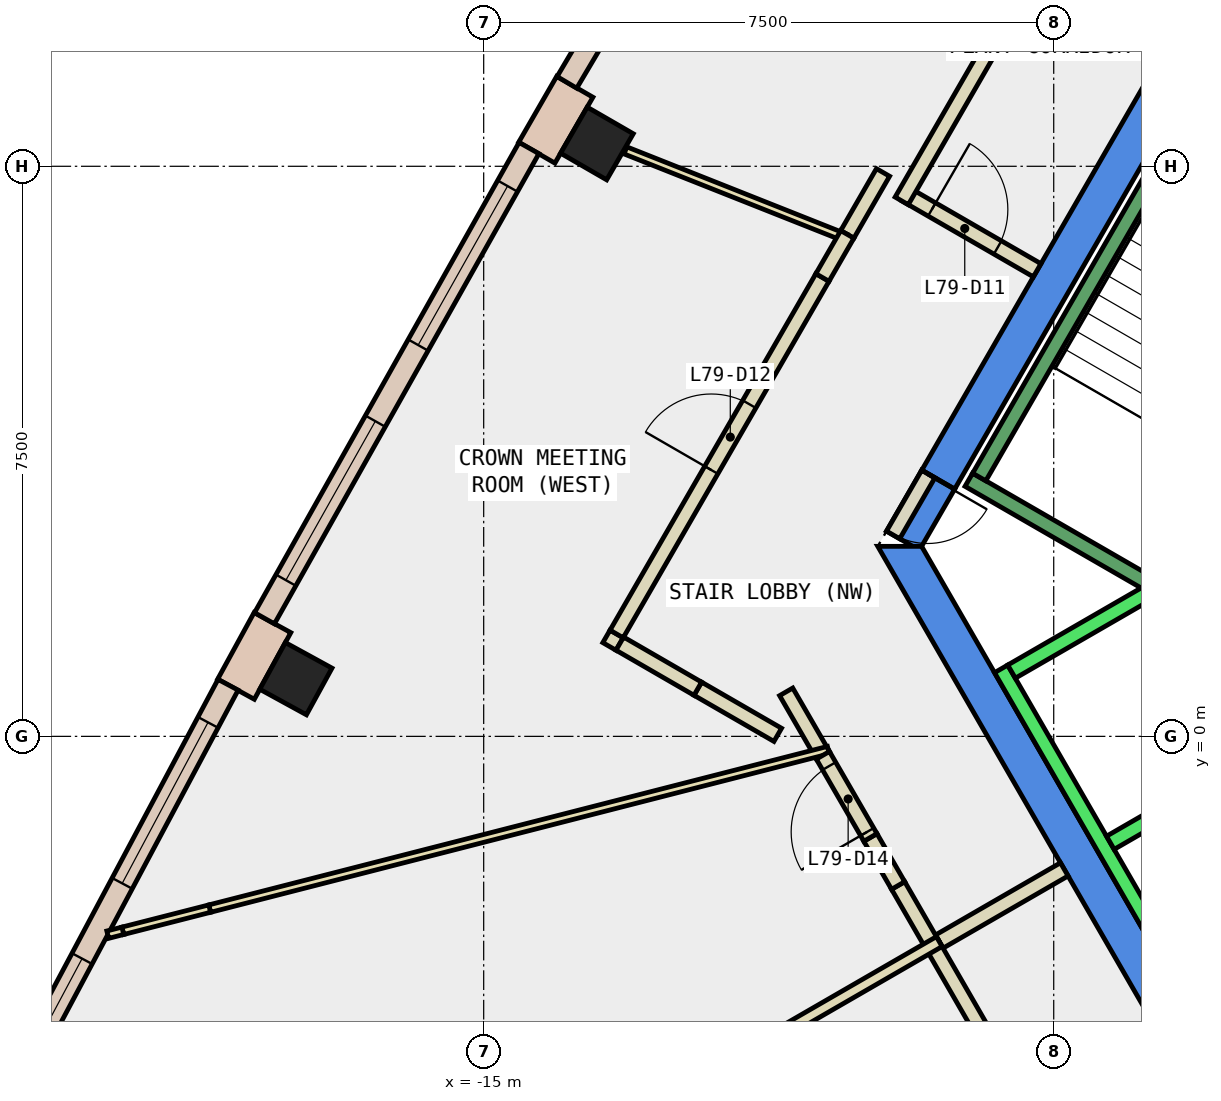
"""IFC4 building model, lengths in metres.
Left out: names, types, materials, properties, quantities, classifications, styles, units other than length and angle.
Written with IfcOpenShell. Run it as: python <this file> out.ifc"""

import sys

from ifc_helpers import new_model, si_unit, direction, frame, frame_2d, origin, origin_2d, place, context, subcontext, project, spatial, polyline, rectangle, outline, extrude, element, fill, save


model = new_model("IFC4")
c1 = context("Model", 3, precision=1e-05, world=origin(), true_north=direction((0.0, 1.0)))
c2 = subcontext(c1, "Body", "Model", "MODEL_VIEW")
j1 = project(units=[si_unit("LENGTHUNIT", "METRE"), si_unit("PLANEANGLEUNIT", "RADIAN")], contexts=[c1])
p1 = place(None, origin())
s1 = spatial("IfcSite", under=j1, at=p1, CompositionType="ELEMENT")
p2 = place(p1, origin())
s2 = spatial("IfcBuilding", under=s1, at=p2, CompositionType="ELEMENT")
p3 = place(p2, frame((0.0, 0.0, 335.9)))
s3 = spatial("IfcBuildingStorey", under=s2, at=p3, CompositionType="ELEMENT", Elevation=335.9)
for number, where, z_axis, x_axis in (
    (1, (-13.51, 7.8, -0.35), (0.0, 0.0, 1.0), (0.5, 0.866, 0.0)),
    (2, (-17.471, 0.759, -0.35), (0.0, 0.0, 1.0), (0.48, 0.877, 0.0)),
):
    element("IfcColumn", number, at=place(p3, frame(where, z_axis=z_axis, x_axis=x_axis)), inside=s3, PredefinedType="COLUMN", context=c2, shape_type="SweptSolid", body=[
        extrude(rectangle(XDim=0.7, YDim=0.7, at=origin_2d()), origin(), (0.0, 0.0, 1.0), 4.4),
    ])
p4 = place(p3, frame((0.0, 0.0, -0.35)))
e3 = element("IfcWall", 3, at=p4, inside=s3, PredefinedType="SHEAR", context=c2, shape_type="SweptSolid", body=[
    extrude(outline(polyline([(-9.236, 3.502), (-8.803, 3.253), (-4.619, 10.5), (-4.907, 11.0), (-9.236, 3.502)])), origin(), (0.0, 0.0, 1.0), 4.4),
])
p5 = place(p3, frame((0.0, 0.0, 3.6)))
e4 = element("IfcWall", 4, at=p5, inside=s3, PredefinedType="SHEAR", context=c2, shape_type="SweptSolid", body=[
    extrude(outline(polyline([(-9.7, 2.7), (-9.354, 2.5), (-9.238, 2.5), (-8.803, 3.253), (-9.236, 3.502), (-9.7, 2.7)])), origin(), (0.0, 0.0, 1.0), 0.45),
])
p6 = place(p3, frame((0.0, 0.0, -0.35)))
e5 = element("IfcWall", 5, at=p6, inside=s3, PredefinedType="SHEAR", context=c2, shape_type="SweptSolid", body=[
    extrude(outline(polyline([(-9.815, 2.5), (-4.907, -6.0), (-4.619, -5.5), (-9.238, 2.5), (-9.815, 2.5)])), origin(), (0.0, 0.0, 1.0), 4.4),
])
p7 = place(p3, frame((-13.801, 8.546, 0.0), z_axis=(0.0, 0.0, 1.0), x_axis=(-0.49960277677, -0.866254619292, 0.0)))
e6 = element("IfcWall", 6, at=p7, inside=s3, PredefinedType="STANDARD", context=c2, shape_type="SweptSolid", body=[
    extrude(rectangle(XDim=1.001, YDim=0.55, at=frame_2d((0.5, 0.0))), origin(), (0.0, 0.0, 1.0), 4.05),
])
p8 = place(p3, frame((-17.779, 1.497, 0.0), z_axis=(0.0, 0.0, 1.0), x_axis=(-0.480117793957, -0.877204026396, 0.0)))
e7 = element("IfcWall", 7, at=p8, inside=s3, PredefinedType="STANDARD", context=c2, shape_type="SweptSolid", body=[
    extrude(rectangle(XDim=1.0, YDim=0.55, at=frame_2d((0.5, 0.0))), origin(), (0.0, 0.0, 1.0), 4.05),
])
p9 = place(p3, frame((-10.287, 14.711, 0.0), z_axis=(0.0, 0.0, 1.0), x_axis=(-0.509697735304, -0.86035354281, 0.0)))
e8 = element("IfcWall", 8, at=p9, inside=s3, PredefinedType="STANDARD", context=c2, shape_type="SweptSolid", body=[
    extrude(rectangle(XDim=7.098, YDim=0.3, at=frame_2d((3.549, 0.0))), origin(), (0.0, 0.0, 1.0), 4.05),
])
p10 = place(p9, frame((0.575, 0.0, 0.9)))
e9 = element("IfcOpeningElement", 9, at=p10, cuts=e8, PredefinedType="OPENING", context=c2, shape_type="SweptSolid", body=[
    extrude(rectangle(XDim=2.4, YDim=3.0, at=frame_2d((1.2, 1.5))), frame((0.0, 0.16, 0.0), z_axis=(0.0, -1.0, 0.0), x_axis=(1.0, 0.0, 0.0)), (0.0, 0.0, 1.0), 0.32),
])
p11 = place(p9, frame((4.124, 0.0, 0.9)))
e10 = element("IfcOpeningElement", 10, at=p11, cuts=e8, PredefinedType="OPENING", context=c2, shape_type="SweptSolid", body=[
    extrude(rectangle(XDim=2.4, YDim=3.0, at=frame_2d((1.2, 1.5))), frame((0.0, 0.16, 0.0), z_axis=(0.0, -1.0, 0.0), x_axis=(1.0, 0.0, 0.0)), (0.0, 0.0, 1.0), 0.32),
])
p12 = place(p3, frame((-14.404, 7.74, 0.0), z_axis=(0.0, 0.0, 1.0), x_axis=(-0.49029716741, -0.871555326775, 0.0)))
e11 = element("IfcWall", 11, at=p12, inside=s3, PredefinedType="STANDARD", context=c2, shape_type="SweptSolid", body=[
    extrude(rectangle(XDim=7.098, YDim=0.3, at=frame_2d((3.549, 0.0))), origin(), (0.0, 0.0, 1.0), 4.05),
])
p13 = place(p12, frame((0.574, 0.0, 0.9)))
e12 = element("IfcOpeningElement", 12, at=p13, cuts=e11, PredefinedType="OPENING", context=c2, shape_type="SweptSolid", body=[
    extrude(rectangle(XDim=2.4, YDim=3.0, at=frame_2d((1.2, 1.5))), frame((0.0, 0.16, 0.0), z_axis=(0.0, -1.0, 0.0), x_axis=(1.0, 0.0, 0.0)), (0.0, 0.0, 1.0), 0.32),
])
p14 = place(p12, frame((4.123, 0.0, 0.9)))
e13 = element("IfcOpeningElement", 13, at=p14, cuts=e11, PredefinedType="OPENING", context=c2, shape_type="SweptSolid", body=[
    extrude(rectangle(XDim=2.4, YDim=3.0, at=frame_2d((1.2, 1.5))), frame((0.0, 0.16, 0.0), z_axis=(0.0, -1.0, 0.0), x_axis=(1.0, 0.0, 0.0)), (0.0, 0.0, 1.0), 0.32),
])
p15 = place(p3, frame((-18.363, 0.679, 0.0), z_axis=(0.0, 0.0, 1.0), x_axis=(-0.470447918342, -0.882427762555, 0.0)))
e14 = element("IfcWall", 14, at=p15, inside=s3, PredefinedType="STANDARD", context=c2, shape_type="SweptSolid", body=[
    extrude(rectangle(XDim=7.044, YDim=0.3, at=frame_2d((3.522, 0.0))), origin(), (0.0, 0.0, 1.0), 4.05),
])
p16 = place(p15, frame((0.561, 0.0, 0.9)))
e15 = element("IfcOpeningElement", 15, at=p16, cuts=e14, PredefinedType="OPENING", context=c2, shape_type="SweptSolid", body=[
    extrude(rectangle(XDim=2.4, YDim=3.0, at=frame_2d((1.2, 1.5))), frame((0.0, 0.16, 0.0), z_axis=(0.0, -1.0, 0.0), x_axis=(1.0, 0.0, 0.0)), (0.0, 0.0, 1.0), 0.32),
])
p17 = place(p15, frame((4.083, 0.0, 0.9)))
e16 = element("IfcOpeningElement", 16, at=p17, cuts=e14, PredefinedType="OPENING", context=c2, shape_type="SweptSolid", body=[
    extrude(rectangle(XDim=2.4, YDim=3.0, at=frame_2d((1.2, 1.5))), frame((0.0, 0.16, 0.0), z_axis=(0.0, -1.0, 0.0), x_axis=(1.0, 0.0, 0.0)), (0.0, 0.0, 1.0), 0.32),
])
p18 = place(p3, frame((-9.006, -2.7, 0.0), z_axis=(0.0, 0.0, 1.0), x_axis=(0.865980106173, 0.500078449558, 0.0)))
e17 = element("IfcWall", 17, at=p18, inside=s3, PredefinedType="PARTITIONING", context=c2, shape_type="SweptSolid", body=[
    extrude(rectangle(XDim=1.9, YDim=0.2, at=frame_2d((0.95, 0.0))), origin(), (0.0, 0.0, 1.0), 4.05),
])
p19 = place(p3, frame((-9.45, 7.132, 0.0), z_axis=(0.0, 0.0, 1.0), x_axis=(0.866010750942, -0.50002537861, 0.0)))
e18 = element("IfcWall", 18, at=p19, inside=s3, PredefinedType="PARTITIONING", context=c2, shape_type="SweptSolid", body=[
    extrude(rectangle(XDim=2.0, YDim=0.2, at=frame_2d((1.0, 0.0))), origin(), (0.0, 0.0, 1.0), 4.05),
])
p20 = place(p19, frame((0.4, 0.0, 0.0)))
e19 = element("IfcOpeningElement", 19, at=p20, cuts=e18, PredefinedType="OPENING", context=c2, shape_type="SweptSolid", body=[
    extrude(rectangle(XDim=1.0, YDim=2.1, at=frame_2d((0.5, 1.05))), frame((0.0, 0.11, 0.0), z_axis=(0.0, -1.0, 0.0), x_axis=(1.0, 0.0, 0.0)), (0.0, 0.0, 1.0), 0.22),
])
p21 = place(p3, frame((-11.131, 0.02, 0.0), z_axis=(0.0, 0.0, 1.0), x_axis=(-0.866182239464, 0.499728254191, 0.0)))
e20 = element("IfcWall", 20, at=p21, inside=s3, PredefinedType="PARTITIONING", context=c2, shape_type="SweptSolid", body=[
    extrude(rectangle(XDim=1.215, YDim=0.2, at=frame_2d((0.607, 0.0))), origin(), (0.0, 0.0, 1.0), 4.05),
])
p22 = place(p3, frame((-13.346, 1.183, 0.0), z_axis=(0.0, 0.0, 1.0), x_axis=(0.501544421243, 0.865131893713, 0.0)))
e21 = element("IfcWall", 21, at=p22, inside=s3, PredefinedType="PARTITIONING", context=c2, shape_type="SweptSolid", body=[
    extrude(rectangle(XDim=0.189, YDim=0.2, at=frame_2d((0.095, 0.0))), origin(), (0.0, 0.0, 1.0), 1.95),
])
p23 = place(p3, frame((-10.537, -0.249, 0.0), z_axis=(0.0, 0.0, 1.0), x_axis=(-0.50065707842, 0.865645706873, 0.0)))
e22 = element("IfcWall", 22, at=p23, inside=s3, PredefinedType="PARTITIONING", context=c2, shape_type="SweptSolid", body=[
    extrude(rectangle(XDim=0.965, YDim=0.2, at=frame_2d((0.482, 0.0))), origin(), (0.0, 0.0, 1.0), 4.05),
])
p24 = place(p3, frame((-10.216, 6.604, 0.0), z_axis=(0.0, 0.0, 1.0), x_axis=(0.499572668549, 0.866271983178, 0.0)))
e23 = element("IfcWall", 23, at=p24, inside=s3, PredefinedType="PARTITIONING", context=c2, shape_type="SweptSolid", body=[
    extrude(rectangle(XDim=0.941, YDim=0.2, at=frame_2d((0.47, 0.0))), origin(), (0.0, 0.0, 1.0), 1.95),
])
p25 = place(p3, frame((-9.105, -2.728, 0.0), z_axis=(0.0, 0.0, 1.0), x_axis=(-0.499849883363, 0.866112056319, 0.0)))
e24 = element("IfcWall", 24, at=p25, inside=s3, PredefinedType="PARTITIONING", context=c2, shape_type="SweptSolid", body=[
    extrude(rectangle(XDim=0.885, YDim=0.2, at=frame_2d((0.442, 0.0))), origin(), (0.0, 0.0, 1.0), 4.05),
])
p26 = place(p3, frame((-9.5, 7.045, 0.0), z_axis=(0.0, 0.0, 1.0), x_axis=(0.500007559336, 0.866021039356, 0.0)))
e25 = element("IfcWall", 25, at=p26, inside=s3, PredefinedType="PARTITIONING", context=c2, shape_type="SweptSolid", body=[
    extrude(rectangle(XDim=4.67, YDim=0.2, at=frame_2d((2.335, 0.0))), origin(), (0.0, 0.0, 1.0), 4.05),
])
p27 = place(p3, frame((-13.135, 7.709, 0.0), z_axis=(0.0, 0.0, 1.0), x_axis=(0.929543616209, -0.368712171707, 0.0)))
e26 = element("IfcWall", 26, at=p27, inside=s3, PredefinedType="PARTITIONING", context=c2, shape_type="SweptSolid", body=[
    extrude(rectangle(XDim=3.113, YDim=0.1, at=frame_2d((1.557, 0.0))), origin(), (0.0, 0.0, 1.0), 1.95),
])
p28 = place(p3, frame((-10.465, -0.181, 0.0), z_axis=(0.0, 0.0, 1.0), x_axis=(-0.968719585482, -0.248157943061, 0.0)))
e27 = element("IfcWall", 27, at=p28, inside=s3, PredefinedType="PARTITIONING", context=c2, shape_type="SweptSolid", body=[
    extrude(rectangle(XDim=8.403, YDim=0.1, at=frame_2d((4.201, 0.0))), origin(), (0.0, 0.0, 1.0), 4.05),
])
p29 = place(p3, frame((-9.15, 3.452, 0.0), z_axis=(0.0, 0.0, 1.0), x_axis=(-0.500079945886, -0.865979242085, 0.0)))
e28 = element("IfcWall", 28, at=p29, inside=s3, PredefinedType="PARTITIONING", context=c2, shape_type="SweptSolid", body=[
    extrude(rectangle(XDim=0.926, YDim=0.2, at=frame_2d((0.463, 0.0))), origin(), (0.0, 0.0, 1.0), 2.4),
])
p30 = place(p29, frame((0.017, 0.0, 0.0)))
e29 = element("IfcOpeningElement", 29, at=p30, cuts=e28, PredefinedType="OPENING", context=c2, shape_type="SweptSolid", body=[
    extrude(rectangle(XDim=0.9, YDim=2.1, at=frame_2d((0.45, 1.05))), frame((0.0, 0.11, 0.0), z_axis=(0.0, -1.0, 0.0), x_axis=(1.0, 0.0, 0.0)), (0.0, 0.0, 1.0), 0.22),
])
p31 = place(p3, frame((-8.185, -4.322, 0.0), z_axis=(0.0, 0.0, 1.0), x_axis=(-0.499848773445, 0.866112696874, 0.0)))
e30 = element("IfcWall", 30, at=p31, inside=s3, PredefinedType="PARTITIONING", context=c2, shape_type="SweptSolid", body=[
    extrude(rectangle(XDim=1.84, YDim=0.2, at=frame_2d((0.92, 0.0))), origin(), (0.0, 0.0, 1.0), 4.05),
])
p32 = place(p3, frame((-20.401, -9.28, 0.0), z_axis=(0.0, 0.0, 1.0), x_axis=(0.865982571061, 0.500074181116, 0.0)))
e31 = element("IfcWall", 31, at=p32, inside=s3, PredefinedType="PARTITIONING", context=c2, shape_type="SweptSolid", body=[
    extrude(rectangle(XDim=13.158, YDim=0.15, at=frame_2d((6.579, 0.0))), origin(), (0.0, 0.0, 1.0), 4.05),
])
p33 = place(p3, frame((-12.183, 0.627, 0.0), z_axis=(0.0, 0.0, 1.0), x_axis=(-0.865759938798, 0.500459517216, 0.0)))
e32 = element("IfcWall", 32, at=p33, inside=s3, PredefinedType="PARTITIONING", context=c2, shape_type="SweptSolid", body=[
    extrude(rectangle(XDim=1.185, YDim=0.2, at=frame_2d((0.593, 0.0))), origin(), (0.0, 0.0, 1.0), 1.95),
])
p34 = place(p3, frame((-13.251, 1.347, 0.0), z_axis=(0.0, 0.0, 1.0), x_axis=(0.50001771527, 0.866015175627, 0.0)))
e33 = element("IfcWall", 33, at=p34, inside=s3, PredefinedType="PARTITIONING", context=c2, shape_type="SweptSolid", body=[
    extrude(rectangle(XDim=5.416, YDim=0.2, at=frame_2d((2.708, 0.0))), origin(), (0.0, 0.0, 1.0), 4.05),
])
p35 = place(p34, frame((2.491, 0.0, 0.0)))
e34 = element("IfcOpeningElement", 34, at=p35, cuts=e33, PredefinedType="OPENING", context=c2, shape_type="SweptSolid", body=[
    extrude(rectangle(XDim=1.0, YDim=2.1, at=frame_2d((0.5, 1.05))), frame((0.0, 0.11, 0.0), z_axis=(0.0, -1.0, 0.0), x_axis=(1.0, 0.0, 0.0)), (0.0, 0.0, 1.0), 0.22),
])
p36 = place(p3, frame((-10.543, 6.037, 0.0), z_axis=(0.0, 0.0, 1.0), x_axis=(0.49955019049, 0.86628494572, 0.0)))
e35 = element("IfcWall", 35, at=p36, inside=s3, PredefinedType="PARTITIONING", context=c2, shape_type="SweptSolid", body=[
    extrude(rectangle(XDim=0.654, YDim=0.2, at=frame_2d((0.327, 0.0))), origin(), (0.0, 0.0, 1.0), 1.95),
])
p37 = place(p3, frame((-9.547, -1.962, 0.0), z_axis=(0.0, 0.0, 1.0), x_axis=(-0.500205129465, 0.865906939836, 0.0)))
e36 = element("IfcWall", 36, at=p37, inside=s3, PredefinedType="PARTITIONING", context=c2, shape_type="SweptSolid", body=[
    extrude(rectangle(XDim=0.73, YDim=0.2, at=frame_2d((0.365, 0.0))), origin(), (0.0, 0.0, 1.0), 1.95),
])
p38 = place(p3, frame((-9.912, -1.33, 0.0), z_axis=(0.0, 0.0, 1.0), x_axis=(-0.500512107711, 0.865729536307, 0.0)))
e37 = element("IfcWall", 37, at=p38, inside=s3, PredefinedType="PARTITIONING", context=c2, shape_type="SweptSolid", body=[
    extrude(rectangle(XDim=1.249, YDim=0.2, at=frame_2d((0.625, 0.0))), origin(), (0.0, 0.0, 1.0), 4.05),
])
p39 = place(p38, frame((0.085, 0.0, 0.0)))
e38 = element("IfcOpeningElement", 38, at=p39, cuts=e37, PredefinedType="OPENING", context=c2, shape_type="SweptSolid", body=[
    extrude(rectangle(XDim=1.0, YDim=2.1, at=frame_2d((0.5, 1.05))), frame((0.0, 0.11, 0.0), z_axis=(0.0, -1.0, 0.0), x_axis=(1.0, 0.0, 0.0)), (0.0, 0.0, 1.0), 0.22),
])
p40 = place(p3, frame((-18.605, -2.266, 0.0), z_axis=(0.0, 0.0, 1.0), x_axis=(-0.968888153569, -0.247498981561, 0.0)))
e39 = element("IfcWall", 39, at=p40, inside=s3, PredefinedType="PARTITIONING", context=c2, shape_type="SweptSolid", body=[
    extrude(rectangle(XDim=1.18, YDim=0.1, at=frame_2d((0.59, 0.0))), origin(), (0.0, 0.0, 1.0), 1.95),
])
p41 = place(p3, frame((-19.748, -2.558, 0.0), z_axis=(0.0, 0.0, 1.0), x_axis=(-0.968649127898, -0.248432821952, 0.0)))
e40 = element("IfcWall", 40, at=p41, inside=s3, PredefinedType="PARTITIONING", context=c2, shape_type="SweptSolid", body=[
    extrude(rectangle(XDim=0.204, YDim=0.1, at=frame_2d((0.102, 0.0))), origin(), (0.0, 0.0, 1.0), 4.05),
])
p42 = place(p3, frame((-8.192, 0.888, 0.0), z_axis=(0.0, 0.0, 1.0), x_axis=(0.500034260056, -0.866005622828, 0.0)))
e41 = element("IfcWall", 41, at=p42, inside=s3, PredefinedType="STANDARD", context=c2, shape_type="SweptSolid", body=[
    extrude(rectangle(XDim=5.399, YDim=0.2, at=frame_2d((2.7, 0.0))), origin(), (0.0, 0.0, 1.0), 4.05),
])
for number, where, z_axis, x_axis in (
    (42, (-5.977, 2.052, 0.0), (0.0, 0.0, 1.0), (-0.866, -0.5, 0.0)),
    (43, (-4.677, -0.2, 0.0), (0.0, 0.0, 1.0), (-0.866, -0.5, 0.0)),
):
    element("IfcWall", number, at=place(p3, frame(where, z_axis=z_axis, x_axis=x_axis)), inside=s3, PredefinedType="STANDARD", context=c2, shape_type="SweptSolid", body=[
        extrude(rectangle(XDim=2.399, YDim=0.2, at=frame_2d((1.2, 0.0))), origin(), (0.0, 0.0, 1.0), 4.05),
    ])
p43 = place(p3, frame((-6.25, 2.01, 0.0), z_axis=(0.0, 0.0, 1.0), x_axis=(-0.86611865017, 0.499838457731, 0.0)))
e44 = element("IfcWall", 44, at=p43, inside=s3, PredefinedType="STANDARD", context=c2, shape_type="SweptSolid", body=[
    extrude(rectangle(XDim=2.733, YDim=0.2, at=frame_2d((1.366, 0.0))), origin(), (0.0, 0.0, 1.0), 4.05),
])
p44 = place(p3, frame((-5.03, 9.388, 0.0), z_axis=(0.0, 0.0, 1.0), x_axis=(-0.499978703459, -0.866037698999, 0.0)))
e45 = element("IfcWall", 45, at=p44, inside=s3, PredefinedType="STANDARD", context=c2, shape_type="SweptSolid", body=[
    extrude(rectangle(XDim=6.9, YDim=0.2, at=frame_2d((3.45, 0.0))), origin(), (0.0, 0.0, 1.0), 4.05),
])
p45 = place(p13, origin())
e46 = element("IfcWindow", 46, at=p45, inside=s3, PartitioningType="SINGLE_PANEL", PredefinedType="WINDOW", context=c2, shape_type="SweptSolid", body=[
    extrude(rectangle(XDim=2.4, YDim=3.0, at=frame_2d((1.2, 1.5))), frame((0.0, 0.03, 0.0), z_axis=(0.0, -1.0, 0.0), x_axis=(1.0, 0.0, 0.0)), (0.0, 0.0, 1.0), 0.06),
])
fill(e12, e46)
p46 = place(p14, origin())
e47 = element("IfcWindow", 47, at=p46, inside=s3, PartitioningType="SINGLE_PANEL", PredefinedType="WINDOW", context=c2, shape_type="SweptSolid", body=[
    extrude(rectangle(XDim=2.4, YDim=3.0, at=frame_2d((1.2, 1.5))), frame((0.0, 0.03, 0.0), z_axis=(0.0, -1.0, 0.0), x_axis=(1.0, 0.0, 0.0)), (0.0, 0.0, 1.0), 0.06),
])
fill(e13, e47)
p47 = place(p16, origin())
e48 = element("IfcWindow", 48, at=p47, inside=s3, PartitioningType="SINGLE_PANEL", PredefinedType="WINDOW", context=c2, shape_type="SweptSolid", body=[
    extrude(rectangle(XDim=2.4, YDim=3.0, at=frame_2d((1.2, 1.5))), frame((0.0, 0.03, 0.0), z_axis=(0.0, -1.0, 0.0), x_axis=(1.0, 0.0, 0.0)), (0.0, 0.0, 1.0), 0.06),
])
fill(e15, e48)
p48 = place(p17, origin())
e49 = element("IfcWindow", 49, at=p48, inside=s3, PartitioningType="SINGLE_PANEL", PredefinedType="WINDOW", context=c2, shape_type="SweptSolid", body=[
    extrude(rectangle(XDim=2.4, YDim=3.0, at=frame_2d((1.2, 1.5))), frame((0.0, 0.03, 0.0), z_axis=(0.0, -1.0, 0.0), x_axis=(1.0, 0.0, 0.0)), (0.0, 0.0, 1.0), 0.06),
])
fill(e16, e49)
p49 = place(p20, origin())
e50 = element("IfcDoor", 50, at=p49, inside=s3, OperationType="SINGLE_SWING_LEFT", PredefinedType="DOOR", context=c2, shape_type="SweptSolid", body=[
    extrude(rectangle(XDim=1.0, YDim=2.1, at=frame_2d((0.5, 1.05))), frame((0.0, 0.025, 0.0), z_axis=(0.0, -1.0, 0.0), x_axis=(1.0, 0.0, 0.0)), (0.0, 0.0, 1.0), 0.05),
])
fill(e19, e50)
p50 = place(p35, origin())
e51 = element("IfcDoor", 51, at=p50, inside=s3, OperationType="SINGLE_SWING_LEFT", PredefinedType="DOOR", context=c2, shape_type="SweptSolid", body=[
    extrude(rectangle(XDim=1.0, YDim=2.1, at=frame_2d((0.5, 1.05))), frame((0.0, 0.025, 0.0), z_axis=(0.0, -1.0, 0.0), x_axis=(1.0, 0.0, 0.0)), (0.0, 0.0, 1.0), 0.05),
])
fill(e34, e51)
p51 = place(p39, origin())
e52 = element("IfcDoor", 52, at=p51, inside=s3, OperationType="SINGLE_SWING_LEFT", PredefinedType="DOOR", context=c2, shape_type="SweptSolid", body=[
    extrude(rectangle(XDim=1.0, YDim=2.1, at=frame_2d((0.5, 1.05))), frame((0.0, 0.025, 0.0), z_axis=(0.0, -1.0, 0.0), x_axis=(1.0, 0.0, 0.0)), (0.0, 0.0, 1.0), 0.05),
])
fill(e38, e52)
p52 = place(p30, origin())
e53 = element("IfcDoor", 53, at=p52, inside=s3, OperationType="SINGLE_SWING_LEFT", PredefinedType="DOOR", context=c2, shape_type="SweptSolid", body=[
    extrude(rectangle(XDim=0.9, YDim=2.1, at=frame_2d((0.45, 1.05))), frame((0.0, 0.025, 0.0), z_axis=(0.0, -1.0, 0.0), x_axis=(1.0, 0.0, 0.0)), (0.0, 0.0, 1.0), 0.05),
])
fill(e29, e53)
save(model, sys.argv[1])
